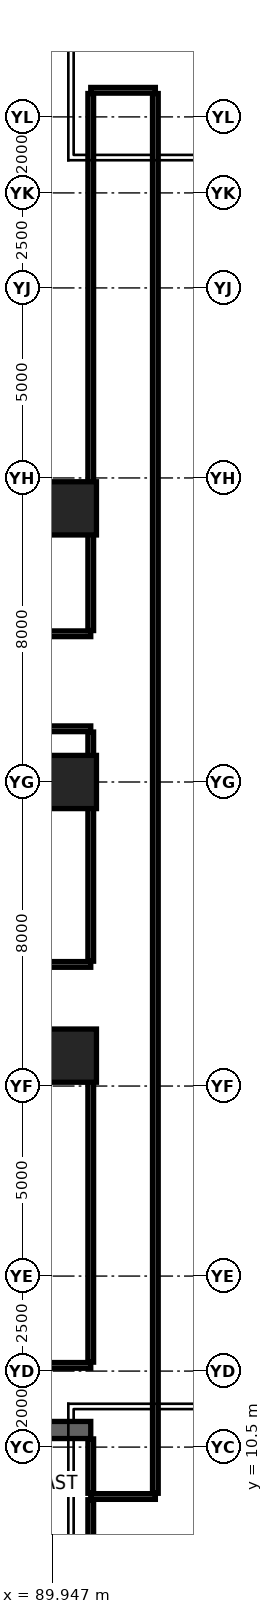
"""IFC4 building model, lengths in metres.
Left out: names, types, materials, properties, quantities, classifications, styles, units other than length and angle.
Written with IfcOpenShell. Run it as: python <this file> out.ifc"""

import sys

from ifc_helpers import new_model, si_unit, direction, frame, frame_2d, origin, origin_2d, place, context, subcontext, project, spatial, rectangle, hollow_rectangle, extrude, element, save


model = new_model("IFC4")
c1 = context("Model", 3, precision=1e-05, world=origin(), true_north=direction((0.0, 1.0)))
c2 = subcontext(c1, "Body", "Model", "MODEL_VIEW")
j1 = project(units=[si_unit("LENGTHUNIT", "METRE"), si_unit("PLANEANGLEUNIT", "RADIAN")], contexts=[c1])
p1 = place(None, origin())
s1 = spatial("IfcSite", under=j1, at=p1, CompositionType="ELEMENT")
p2 = place(p1, origin())
s2 = spatial("IfcBuilding", under=s1, at=p2, CompositionType="ELEMENT")
p3 = place(p2, frame((0.0, 0.0, 18.1)))
s3 = spatial("IfcBuildingStorey", under=s2, at=p3, CompositionType="ELEMENT", Elevation=18.1)
for number, where, z_axis, x_axis in (
    (1, (90.4, 20.8, 0.0), (0.0, 0.0, 1.0), (1.0, 0.0, 0.0)),
    (2, (90.4, 28.0, 0.0), (0.0, 0.0, 1.0), (1.0, 0.0, 0.0)),
    (3, (90.4, 35.2, 0.0), (0.0, 0.0, 1.0), (1.0, 0.0, 0.0)),
):
    element("IfcColumn", number, at=place(p3, frame(where, z_axis=z_axis, x_axis=x_axis)), inside=s3, PredefinedType="COLUMN", context=c2, shape_type="SweptSolid", body=[
        extrude(hollow_rectangle(XDim=1.4, YDim=1.4, WallThickness=0.08, at=origin_2d()), origin(), (0.0, 0.0, 1.0), 4.3),
    ])
p4 = place(p3, frame((90.95, 9.2, 0.0), z_axis=(0.0, 0.0, 1.0), x_axis=(1.0, 0.0, 0.0)))
e4 = element("IfcWall", 4, at=p4, inside=s3, PredefinedType="PARTITIONING", context=c2, shape_type="SweptSolid", body=[
    extrude(rectangle(XDim=1.7, YDim=0.15, at=frame_2d((0.85, 0.0))), origin(), (0.0, 0.0, 1.0), 3.65),
])
p5 = place(p3, frame((61.8, 10.95, 0.0), z_axis=(0.0, 0.0, 1.0), x_axis=(1.0, 0.0, 0.0)))
e5 = element("IfcWall", 5, at=p5, inside=s3, PredefinedType="SHEAR", context=c2, shape_type="SweptSolid", body=[
    extrude(rectangle(XDim=29.15, YDim=0.45, at=frame_2d((14.575, 0.0))), origin(), (0.0, 0.0, 1.0), 3.65),
])
p6 = place(p5, frame((7.57, 0.0, 0.0)))
e6 = element("IfcOpeningElement", 6, at=p6, cuts=e5, PredefinedType="OPENING", context=c2, shape_type="SweptSolid", body=[
    extrude(rectangle(XDim=1.15, YDim=2.2, at=frame_2d((0.575, 1.1))), frame((0.0, 0.235, 0.0), z_axis=(0.0, -1.0, 0.0), x_axis=(1.0, 0.0, 0.0)), (0.0, 0.0, 1.0), 0.47),
])
p7 = place(p5, frame((21.63, 0.0, 0.0)))
e7 = element("IfcOpeningElement", 7, at=p7, cuts=e5, PredefinedType="OPENING", context=c2, shape_type="SweptSolid", body=[
    extrude(rectangle(XDim=1.05, YDim=2.2, at=frame_2d((0.525, 1.1))), frame((0.0, 0.235, 0.0), z_axis=(0.0, -1.0, 0.0), x_axis=(1.0, 0.0, 0.0)), (0.0, 0.0, 1.0), 0.47),
])
p8 = place(p3, frame((61.8, 12.65, 0.0), z_axis=(0.0, 0.0, 1.0), x_axis=(1.0, 0.0, 0.0)))
e8 = element("IfcWall", 8, at=p8, inside=s3, PredefinedType="PARTITIONING", context=c2, shape_type="SweptSolid", body=[
    extrude(rectangle(XDim=29.15, YDim=0.15, at=frame_2d((14.575, 0.0))), origin(), (0.0, 0.0, 1.0), 2.786),
])
p9 = place(p3, frame((85.37, 20.8, 0.0), z_axis=(0.0, 0.0, 1.0), x_axis=(1.0, 0.0, 0.0)))
e9 = element("IfcWall", 9, at=p9, inside=s3, PredefinedType="PARTITIONING", context=c2, shape_type="SweptSolid", body=[
    extrude(rectangle(XDim=5.58, YDim=0.15, at=frame_2d((2.79, 0.0))), origin(), (0.0, 0.0, 1.0), 2.542),
])
p10 = place(p3, frame((61.8, 23.2, 0.0), z_axis=(0.0, 0.0, 1.0), x_axis=(1.0, 0.0, 0.0)))
e10 = element("IfcWall", 10, at=p10, inside=s3, PredefinedType="PARTITIONING", context=c2, shape_type="SweptSolid", body=[
    extrude(rectangle(XDim=29.15, YDim=0.15, at=frame_2d((14.575, 0.0))), origin(), (0.0, 0.0, 1.0), 2.715),
])
p11 = place(p10, frame((6.225, 0.0, 0.0)))
e11 = element("IfcOpeningElement", 11, at=p11, cuts=e10, PredefinedType="OPENING", context=c2, shape_type="SweptSolid", body=[
    extrude(rectangle(XDim=0.9, YDim=2.1, at=frame_2d((0.45, 1.05))), frame((0.0, 0.085, 0.0), z_axis=(0.0, -1.0, 0.0), x_axis=(1.0, 0.0, 0.0)), (0.0, 0.0, 1.0), 0.17),
])
p12 = place(p10, frame((15.15, 0.0, 0.0)))
e12 = element("IfcOpeningElement", 12, at=p12, cuts=e10, PredefinedType="OPENING", context=c2, shape_type="SweptSolid", body=[
    extrude(rectangle(XDim=1.05, YDim=2.2, at=frame_2d((0.525, 1.1))), frame((0.0, 0.085, 0.0), z_axis=(0.0, -1.0, 0.0), x_axis=(1.0, 0.0, 0.0)), (0.0, 0.0, 1.0), 0.17),
])
p13 = place(p3, frame((85.22, 29.4, 0.0), z_axis=(0.0, 0.0, 1.0), x_axis=(1.0, 0.0, 0.0)))
e13 = element("IfcWall", 13, at=p13, inside=s3, PredefinedType="PARTITIONING", context=c2, shape_type="SweptSolid", body=[
    extrude(rectangle(XDim=5.73, YDim=0.15, at=frame_2d((2.865, 0.0))), origin(), (0.0, 0.0, 1.0), 2.786),
])
p14 = place(p3, frame((72.85, 31.9, 0.0), z_axis=(0.0, 0.0, 1.0), x_axis=(1.0, 0.0, 0.0)))
e14 = element("IfcWall", 14, at=p14, inside=s3, PredefinedType="PARTITIONING", context=c2, shape_type="SweptSolid", body=[
    extrude(rectangle(XDim=18.1, YDim=0.15, at=frame_2d((9.05, 0.0))), origin(), (0.0, 0.0, 1.0), 2.715),
])
p15 = place(p14, frame((9.21, 0.0, 0.0)))
e15 = element("IfcOpeningElement", 15, at=p15, cuts=e14, PredefinedType="OPENING", context=c2, shape_type="SweptSolid", body=[
    extrude(rectangle(XDim=1.2, YDim=2.25, at=frame_2d((0.6, 1.125))), frame((0.0, 0.085, 0.0), z_axis=(0.0, -1.0, 0.0), x_axis=(1.0, 0.0, 0.0)), (0.0, 0.0, 1.0), 0.17),
])
p16 = place(p14, frame((4.59, 0.0, 0.0)))
e16 = element("IfcOpeningElement", 16, at=p16, cuts=e14, PredefinedType="OPENING", context=c2, shape_type="SweptSolid", body=[
    extrude(rectangle(XDim=1.2, YDim=2.25, at=frame_2d((0.6, 1.125))), frame((0.0, 0.085, 0.0), z_axis=(0.0, -1.0, 0.0), x_axis=(1.0, 0.0, 0.0)), (0.0, 0.0, 1.0), 0.17),
])
p17 = place(p3, frame((90.95, 46.2, 0.0), z_axis=(0.0, 0.0, 1.0), x_axis=(1.0, 0.0, 0.0)))
e17 = element("IfcWall", 17, at=p17, inside=s3, PredefinedType="PARTITIONING", context=c2, shape_type="SweptSolid", body=[
    extrude(rectangle(XDim=1.7, YDim=0.15, at=frame_2d((0.85, 0.0))), origin(), (0.0, 0.0, 1.0), 3.65),
])
p18 = place(p3, frame((90.95, 7.685, 0.0), z_axis=(0.0, 0.0, 1.0), x_axis=(0.0, 1.0, 0.0)))
e18 = element("IfcWall", 18, at=p18, inside=s3, PredefinedType="PARTITIONING", context=c2, shape_type="SweptSolid", body=[
    extrude(rectangle(XDim=1.43, YDim=0.15, at=frame_2d((0.715, 0.0))), origin(), (0.0, 0.0, 1.0), 3.65),
])
p19 = place(p3, frame((90.95, 9.285, 0.0), z_axis=(0.0, 0.0, 1.0), x_axis=(0.0, 1.0, 0.0)))
e19 = element("IfcWall", 19, at=p19, inside=s3, PredefinedType="PARTITIONING", context=c2, shape_type="SweptSolid", body=[
    extrude(rectangle(XDim=1.43, YDim=0.15, at=frame_2d((0.715, 0.0))), origin(), (0.0, 0.0, 1.0), 3.65),
])
p20 = place(p3, frame((90.95, 12.735, 0.0), z_axis=(0.0, 0.0, 1.0), x_axis=(0.0, 1.0, 0.0)))
e20 = element("IfcWall", 20, at=p20, inside=s3, PredefinedType="PARTITIONING", context=c2, shape_type="SweptSolid", body=[
    extrude(rectangle(XDim=7.98, YDim=0.15, at=frame_2d((3.99, 0.0))), origin(), (0.0, 0.0, 1.0), 2.786),
])
p21 = place(p3, frame((90.95, 23.285, 0.0), z_axis=(0.0, 0.0, 1.0), x_axis=(0.0, 1.0, 0.0)))
e21 = element("IfcWall", 21, at=p21, inside=s3, PredefinedType="PARTITIONING", context=c2, shape_type="SweptSolid", body=[
    extrude(rectangle(XDim=6.03, YDim=0.15, at=frame_2d((3.015, 0.0))), origin(), (0.0, 0.0, 1.0), 2.869),
])
p22 = place(p3, frame((90.95, 31.985, 0.0), z_axis=(0.0, 0.0, 1.0), x_axis=(0.0, 1.0, 0.0)))
e22 = element("IfcWall", 22, at=p22, inside=s3, PredefinedType="PARTITIONING", context=c2, shape_type="SweptSolid", body=[
    extrude(rectangle(XDim=14.13, YDim=0.15, at=frame_2d((7.065, 0.0))), origin(), (0.0, 0.0, 1.0), 2.786),
])
p23 = place(p3, frame((92.65, 9.285, 0.0), z_axis=(0.0, 0.0, 1.0), x_axis=(0.0, 1.0, 0.0)))
e23 = element("IfcWall", 23, at=p23, inside=s3, PredefinedType="PARTITIONING", context=c2, shape_type="SweptSolid", body=[
    extrude(rectangle(XDim=36.83, YDim=0.15, at=frame_2d((18.415, 0.0))), origin(), (0.0, 0.0, 1.0), 2.786),
])
save(model, sys.argv[1])
